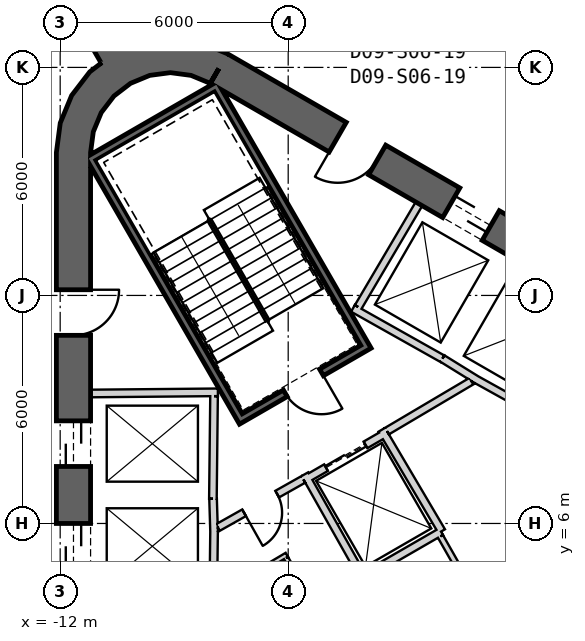
"""IFC4 building model, lengths in metres.
Left out: names, types, materials, properties, quantities, classifications, styles, units other than length and angle.
Written with IfcOpenShell. Run it as: python <this file> out.ifc"""

import sys

from ifc_helpers import new_model, si_unit, direction, frame, frame_2d, origin, place, context, subcontext, project, spatial, polyline, rectangle, outline, extrude, element, fill, save


model = new_model("IFC4")
c1 = context("Model", 3, precision=1e-05, world=origin(), true_north=direction((0.0, 1.0)))
c2 = subcontext(c1, "Body", "Model", "MODEL_VIEW")
j1 = project(units=[si_unit("LENGTHUNIT", "METRE"), si_unit("PLANEANGLEUNIT", "RADIAN")], contexts=[c1])
p1 = place(None, origin())
s1 = spatial("IfcSite", under=j1, at=p1, CompositionType="ELEMENT")
p2 = place(p1, origin())
s2 = spatial("IfcBuilding", under=s1, at=p2, CompositionType="ELEMENT")
p3 = place(p2, frame((0.0, 0.0, 119.3)))
s3 = spatial("IfcBuildingStorey", under=s2, at=p3, CompositionType="ELEMENT", Elevation=119.3)
p4 = place(p3, frame((19.475, 2.208, 0.0), z_axis=(0.0, 0.0, 1.0), x_axis=(-0.866028369851, 0.499994862586, 0.0)))
e1 = element("IfcWall", 1, at=p4, inside=s3, PredefinedType="SHEAR", context=c2, shape_type="SweptSolid", body=[
    extrude(rectangle(XDim=31.523, YDim=0.9, at=frame_2d((15.762, 0.0))), origin(), (0.0, 0.0, 1.0), 4.1),
])
p5 = place(p4, frame((7.062, 0.0, 0.0)))
e2 = element("IfcOpeningElement", 2, at=p5, cuts=e1, PredefinedType="OPENING", context=c2, shape_type="SweptSolid", body=[
    extrude(rectangle(XDim=1.2, YDim=2.4, at=frame_2d((0.6, 1.2))), frame((0.0, 0.46, 0.0), z_axis=(0.0, -1.0, 0.0), x_axis=(1.0, 0.0, 0.0)), (0.0, 0.0, 1.0), 0.92),
])
p6 = place(p4, frame((9.762, 0.0, 0.0)))
e3 = element("IfcOpeningElement", 3, at=p6, cuts=e1, PredefinedType="OPENING", context=c2, shape_type="SweptSolid", body=[
    extrude(rectangle(XDim=1.2, YDim=2.4, at=frame_2d((0.6, 1.2))), frame((0.0, 0.46, 0.0), z_axis=(0.0, -1.0, 0.0), x_axis=(1.0, 0.0, 0.0)), (0.0, 0.0, 1.0), 0.92),
])
p7 = place(p4, frame((12.462, 0.0, 0.0)))
e4 = element("IfcOpeningElement", 4, at=p7, cuts=e1, PredefinedType="OPENING", context=c2, shape_type="SweptSolid", body=[
    extrude(rectangle(XDim=1.2, YDim=2.4, at=frame_2d((0.6, 1.2))), frame((0.0, 0.46, 0.0), z_axis=(0.0, -1.0, 0.0), x_axis=(1.0, 0.0, 0.0)), (0.0, 0.0, 1.0), 0.92),
])
p8 = place(p4, frame((15.162, 0.0, 0.0)))
e5 = element("IfcOpeningElement", 5, at=p8, cuts=e1, PredefinedType="OPENING", context=c2, shape_type="SweptSolid", body=[
    extrude(rectangle(XDim=1.2, YDim=2.4, at=frame_2d((0.6, 1.2))), frame((0.0, 0.46, 0.0), z_axis=(0.0, -1.0, 0.0), x_axis=(1.0, 0.0, 0.0)), (0.0, 0.0, 1.0), 0.92),
])
p9 = place(p4, frame((17.862, 0.0, 0.0)))
e6 = element("IfcOpeningElement", 6, at=p9, cuts=e1, PredefinedType="OPENING", context=c2, shape_type="SweptSolid", body=[
    extrude(rectangle(XDim=1.2, YDim=2.4, at=frame_2d((0.6, 1.2))), frame((0.0, 0.46, 0.0), z_axis=(0.0, -1.0, 0.0), x_axis=(1.0, 0.0, 0.0)), (0.0, 0.0, 1.0), 0.92),
])
p10 = place(p4, frame((20.562, 0.0, 0.0)))
e7 = element("IfcOpeningElement", 7, at=p10, cuts=e1, PredefinedType="OPENING", context=c2, shape_type="SweptSolid", body=[
    extrude(rectangle(XDim=1.2, YDim=2.4, at=frame_2d((0.6, 1.2))), frame((0.0, 0.46, 0.0), z_axis=(0.0, -1.0, 0.0), x_axis=(1.0, 0.0, 0.0)), (0.0, 0.0, 1.0), 0.92),
])
p11 = place(p4, frame((23.262, 0.0, 0.0)))
e8 = element("IfcOpeningElement", 8, at=p11, cuts=e1, PredefinedType="OPENING", context=c2, shape_type="SweptSolid", body=[
    extrude(rectangle(XDim=1.2, YDim=2.4, at=frame_2d((0.6, 1.2))), frame((0.0, 0.46, 0.0), z_axis=(0.0, -1.0, 0.0), x_axis=(1.0, 0.0, 0.0)), (0.0, 0.0, 1.0), 0.92),
])
p12 = place(p4, frame((3.612, 0.0, 0.0)))
e9 = element("IfcOpeningElement", 9, at=p12, cuts=e1, PredefinedType="OPENING", context=c2, shape_type="SweptSolid", body=[
    extrude(rectangle(XDim=1.2, YDim=2.4, at=frame_2d((0.6, 1.2))), frame((0.0, 0.46, 0.0), z_axis=(0.0, -1.0, 0.0), x_axis=(1.0, 0.0, 0.0)), (0.0, 0.0, 1.0), 0.92),
])
p13 = place(p4, frame((26.712, 0.0, 0.0)))
e10 = element("IfcOpeningElement", 10, at=p13, cuts=e1, PredefinedType="OPENING", context=c2, shape_type="SweptSolid", body=[
    extrude(rectangle(XDim=1.2, YDim=2.4, at=frame_2d((0.6, 1.2))), frame((0.0, 0.46, 0.0), z_axis=(0.0, -1.0, 0.0), x_axis=(1.0, 0.0, 0.0)), (0.0, 0.0, 1.0), 0.92),
])
p14 = place(p3, frame((-11.65, 15.762, 0.0), z_axis=(0.0, 0.0, 1.0), x_axis=(0.0, -1.0, 0.0)))
e11 = element("IfcWall", 11, at=p14, inside=s3, PredefinedType="SHEAR", context=c2, shape_type="SweptSolid", body=[
    extrude(rectangle(XDim=31.523, YDim=0.9, at=frame_2d((15.762, 0.0))), origin(), (0.0, 0.0, 1.0), 4.1),
])
p15 = place(p14, frame((7.062, 0.0, 0.0)))
e12 = element("IfcOpeningElement", 12, at=p15, cuts=e11, PredefinedType="OPENING", context=c2, shape_type="SweptSolid", body=[
    extrude(rectangle(XDim=1.2, YDim=2.4, at=frame_2d((0.6, 1.2))), frame((0.0, 0.46, 0.0), z_axis=(0.0, -1.0, 0.0), x_axis=(1.0, 0.0, 0.0)), (0.0, 0.0, 1.0), 0.92),
])
p16 = place(p14, frame((9.762, 0.0, 0.0)))
e13 = element("IfcOpeningElement", 13, at=p16, cuts=e11, PredefinedType="OPENING", context=c2, shape_type="SweptSolid", body=[
    extrude(rectangle(XDim=1.2, YDim=2.4, at=frame_2d((0.6, 1.2))), frame((0.0, 0.46, 0.0), z_axis=(0.0, -1.0, 0.0), x_axis=(1.0, 0.0, 0.0)), (0.0, 0.0, 1.0), 0.92),
])
p17 = place(p14, frame((12.462, 0.0, 0.0)))
e14 = element("IfcOpeningElement", 14, at=p17, cuts=e11, PredefinedType="OPENING", context=c2, shape_type="SweptSolid", body=[
    extrude(rectangle(XDim=1.2, YDim=2.4, at=frame_2d((0.6, 1.2))), frame((0.0, 0.46, 0.0), z_axis=(0.0, -1.0, 0.0), x_axis=(1.0, 0.0, 0.0)), (0.0, 0.0, 1.0), 0.92),
])
p18 = place(p14, frame((15.162, 0.0, 0.0)))
e15 = element("IfcOpeningElement", 15, at=p18, cuts=e11, PredefinedType="OPENING", context=c2, shape_type="SweptSolid", body=[
    extrude(rectangle(XDim=1.2, YDim=2.4, at=frame_2d((0.6, 1.2))), frame((0.0, 0.46, 0.0), z_axis=(0.0, -1.0, 0.0), x_axis=(1.0, 0.0, 0.0)), (0.0, 0.0, 1.0), 0.92),
])
p19 = place(p14, frame((17.862, 0.0, 0.0)))
e16 = element("IfcOpeningElement", 16, at=p19, cuts=e11, PredefinedType="OPENING", context=c2, shape_type="SweptSolid", body=[
    extrude(rectangle(XDim=1.2, YDim=2.4, at=frame_2d((0.6, 1.2))), frame((0.0, 0.46, 0.0), z_axis=(0.0, -1.0, 0.0), x_axis=(1.0, 0.0, 0.0)), (0.0, 0.0, 1.0), 0.92),
])
p20 = place(p14, frame((20.562, 0.0, 0.0)))
e17 = element("IfcOpeningElement", 17, at=p20, cuts=e11, PredefinedType="OPENING", context=c2, shape_type="SweptSolid", body=[
    extrude(rectangle(XDim=1.2, YDim=2.4, at=frame_2d((0.6, 1.2))), frame((0.0, 0.46, 0.0), z_axis=(0.0, -1.0, 0.0), x_axis=(1.0, 0.0, 0.0)), (0.0, 0.0, 1.0), 0.92),
])
p21 = place(p14, frame((23.262, 0.0, 0.0)))
e18 = element("IfcOpeningElement", 18, at=p21, cuts=e11, PredefinedType="OPENING", context=c2, shape_type="SweptSolid", body=[
    extrude(rectangle(XDim=1.2, YDim=2.4, at=frame_2d((0.6, 1.2))), frame((0.0, 0.46, 0.0), z_axis=(0.0, -1.0, 0.0), x_axis=(1.0, 0.0, 0.0)), (0.0, 0.0, 1.0), 0.92),
])
p22 = place(p14, frame((3.612, 0.0, 0.0)))
e19 = element("IfcOpeningElement", 19, at=p22, cuts=e11, PredefinedType="OPENING", context=c2, shape_type="SweptSolid", body=[
    extrude(rectangle(XDim=1.2, YDim=2.4, at=frame_2d((0.6, 1.2))), frame((0.0, 0.46, 0.0), z_axis=(0.0, -1.0, 0.0), x_axis=(1.0, 0.0, 0.0)), (0.0, 0.0, 1.0), 0.92),
])
p23 = place(p14, frame((26.712, 0.0, 0.0)))
e20 = element("IfcOpeningElement", 20, at=p23, cuts=e11, PredefinedType="OPENING", context=c2, shape_type="SweptSolid", body=[
    extrude(rectangle(XDim=1.2, YDim=2.4, at=frame_2d((0.6, 1.2))), frame((0.0, 0.46, 0.0), z_axis=(0.0, -1.0, 0.0), x_axis=(1.0, 0.0, 0.0)), (0.0, 0.0, 1.0), 0.92),
])
p24 = place(p3, origin())
e21 = element("IfcWall", 21, at=p24, inside=s3, PredefinedType="SHEAR", context=c2, shape_type="SweptSolid", body=[
    extrude(outline(polyline([(-7.6, 18.36), (-8.323, 18.659), (-9.1, 18.762), (-9.876, 18.659), (-10.6, 18.36), (-11.221, 17.883), (-11.698, 17.262), (-11.998, 16.538), (-12.1, 15.762), (-11.2, 15.762), (-11.128, 16.305), (-10.919, 16.812), (-10.585, 17.247), (-10.15, 17.58), (-9.644, 17.79), (-9.1, 17.862), (-8.556, 17.79), (-8.05, 17.58), (-7.6, 18.36)])), origin(), (0.0, 0.0, 1.0), 4.1),
])
p25 = place(p3, frame((-10.575, 18.316, 0.0), z_axis=(0.0, 0.0, 1.0), x_axis=(-0.500008359956, 0.866020577108, 0.0)))
e22 = element("IfcWall", 22, at=p25, inside=s3, PredefinedType="SHEAR", context=c2, shape_type="SweptSolid", body=[
    extrude(rectangle(XDim=12.812, YDim=0.8, at=frame_2d((6.406, 0.0))), origin(), (0.0, 0.0, 1.0), 4.1),
])
p26 = place(p25, frame((1.9, 0.0, 0.0)))
e23 = element("IfcOpeningElement", 23, at=p26, cuts=e22, PredefinedType="OPENING", context=c2, shape_type="SweptSolid", body=[
    extrude(rectangle(XDim=1.4, YDim=2.4, at=frame_2d((0.7, 1.2))), frame((0.0, 0.41, 0.0), z_axis=(0.0, -1.0, 0.0), x_axis=(1.0, 0.0, 0.0)), (0.0, 0.0, 1.0), 0.82),
])
p27 = place(p3, frame((-11.2, 9.42, 0.0), z_axis=(0.0, 0.0, 1.0), x_axis=(0.999957167047, 0.009255488683, 0.0)))
e24 = element("IfcWall", 24, at=p27, inside=s3, PredefinedType="PLUMBINGWALL", context=c2, shape_type="SweptSolid", body=[
    extrude(rectangle(XDim=3.35, YDim=0.2, at=frame_2d((1.675, 0.0))), origin(), (0.0, 0.0, 1.0), 3.8),
])
p28 = place(p3, frame((-7.951, 9.35, 0.0), z_axis=(0.0, 0.0, 1.0), x_axis=(-0.011120469654, -0.999938165666, 0.0)))
e25 = element("IfcWall", 25, at=p28, inside=s3, PredefinedType="PLUMBINGWALL", context=c2, shape_type="SweptSolid", body=[
    extrude(rectangle(XDim=2.7, YDim=0.2, at=frame_2d((1.35, 0.0))), origin(), (0.0, 0.0, 1.0), 3.8),
])
p29 = place(p3, frame((-7.977, 6.65, 0.0), z_axis=(0.0, 0.0, 1.0), x_axis=(0.030861509705, -0.999523670164, 0.0)))
e26 = element("IfcWall", 26, at=p29, inside=s3, PredefinedType="PLUMBINGWALL", context=c2, shape_type="SweptSolid", body=[
    extrude(rectangle(XDim=0.878, YDim=0.2, at=frame_2d((0.439, 0.0))), origin(), (0.0, 0.0, 1.0), 3.8),
])
p30 = place(p3, frame((-7.949, 5.895, 0.0), z_axis=(0.0, 0.0, 1.0), x_axis=(-0.012042535896, -0.999927486035, 0.0)))
e27 = element("IfcWall", 27, at=p30, inside=s3, PredefinedType="PLUMBINGWALL", context=c2, shape_type="SweptSolid", body=[
    extrude(rectangle(XDim=1.845, YDim=0.2, at=frame_2d((0.922, 0.0))), origin(), (0.0, 0.0, 1.0), 3.8),
])
p31 = place(p3, frame((-1.941, 10.339, 0.0), z_axis=(0.0, 0.0, 1.0), x_axis=(0.850216889117, -0.526432561171, 0.0)))
e28 = element("IfcWall", 28, at=p31, inside=s3, PredefinedType="PLUMBINGWALL", context=c2, shape_type="SweptSolid", body=[
    extrude(rectangle(XDim=1.078, YDim=0.2, at=frame_2d((0.539, 0.0))), origin(), (0.0, 0.0, 1.0), 3.8),
])
p32 = place(p3, frame((0.483, 8.936, 0.0), z_axis=(0.0, 0.0, 1.0), x_axis=(-0.874269620932, 0.485440655401, 0.0)))
e29 = element("IfcWall", 29, at=p32, inside=s3, PredefinedType="PLUMBINGWALL", context=c2, shape_type="SweptSolid", body=[
    extrude(rectangle(XDim=1.845, YDim=0.2, at=frame_2d((0.922, 0.0))), origin(), (0.0, 0.0, 1.0), 3.8),
])
p33 = place(p3, frame((-4.296, 11.659, 0.0), z_axis=(0.0, 0.0, 1.0), x_axis=(0.871534483978, -0.490334215854, 0.0)))
e30 = element("IfcWall", 30, at=p33, inside=s3, PredefinedType="PLUMBINGWALL", context=c2, shape_type="SweptSolid", body=[
    extrude(rectangle(XDim=2.7, YDim=0.2, at=frame_2d((1.35, 0.0))), origin(), (0.0, 0.0, 1.0), 3.8),
])
p34 = place(p3, frame((-4.158, 11.696, 0.0), z_axis=(0.0, 0.0, 1.0), x_axis=(0.508018930956, 0.861345903683, 0.0)))
e31 = element("IfcWall", 31, at=p34, inside=s3, PredefinedType="PLUMBINGWALL", context=c2, shape_type="SweptSolid", body=[
    extrude(rectangle(XDim=3.15, YDim=0.2, at=frame_2d((1.575, 0.0))), origin(), (0.0, 0.0, 1.0), 3.8),
])
p35 = place(p3, frame((-11.245, 15.678, -0.3), z_axis=(0.0, 0.0, 1.0), x_axis=(0.499977274689, -0.866038523851, 0.0)))
e32 = element("IfcWall", 32, at=p35, inside=s3, PredefinedType="SHEAR", context=c2, shape_type="SweptSolid", body=[
    extrude(rectangle(XDim=8.1, YDim=0.2, at=frame_2d((4.05, 0.0))), origin(), (0.0, 0.0, 1.0), 4.1),
])
p36 = place(p3, frame((-7.818, 17.541, -0.3), z_axis=(0.0, 0.0, 1.0), x_axis=(-0.866044365799, -0.499967155389, 0.0)))
e33 = element("IfcWall", 33, at=p36, inside=s3, PredefinedType="SHEAR", context=c2, shape_type="SweptSolid", body=[
    extrude(rectangle(XDim=3.8, YDim=0.2, at=frame_2d((1.9, 0.0))), origin(), (0.0, 0.0, 1.0), 4.1),
])
p37 = place(p3, frame((-7.854, 17.405, -0.3), z_axis=(0.0, 0.0, 1.0), x_axis=(0.499997992926, -0.866026562566, 0.0)))
e34 = element("IfcWall", 34, at=p37, inside=s3, PredefinedType="SHEAR", context=c2, shape_type="SweptSolid", body=[
    extrude(rectangle(XDim=7.9, YDim=0.2, at=frame_2d((3.95, 0.0))), origin(), (0.0, 0.0, 1.0), 4.1),
])
p38 = place(p3, frame((-7.159, 8.8, -0.3), z_axis=(0.0, 0.0, 1.0), x_axis=(0.866047807691, 0.499961193289, 0.0)))
e35 = element("IfcWall", 35, at=p38, inside=s3, PredefinedType="SHEAR", context=c2, shape_type="SweptSolid", body=[
    extrude(rectangle(XDim=3.6, YDim=0.2, at=frame_2d((1.8, 0.0))), origin(), (0.0, 0.0, 1.0), 4.1),
])
p39 = place(p38, frame((1.25, 0.0, 0.3)))
e36 = element("IfcOpeningElement", 36, at=p39, cuts=e35, PredefinedType="OPENING", context=c2, shape_type="SweptSolid", body=[
    extrude(rectangle(XDim=1.1, YDim=2.1, at=frame_2d((0.55, 1.05))), frame((0.0, 0.11, 0.0), z_axis=(0.0, -1.0, 0.0), x_axis=(1.0, 0.0, 0.0)), (0.0, 0.0, 1.0), 0.22),
])
p40 = place(p3, frame((-5.524, 7.168, 0.0), z_axis=(0.0, 0.0, 1.0), x_axis=(0.866024647952, 0.500001309137, 0.0)))
e37 = element("IfcWall", 37, at=p40, inside=s3, PredefinedType="PLUMBINGWALL", context=c2, shape_type="SweptSolid", body=[
    extrude(rectangle(XDim=2.4, YDim=0.2, at=frame_2d((1.2, 0.0))), origin(), (0.0, 0.0, 1.0), 3.8),
])
p41 = place(p40, frame((0.6, 0.0, 0.0)))
e38 = element("IfcOpeningElement", 38, at=p41, cuts=e37, PredefinedType="OPENING", context=c2, shape_type="SweptSolid", body=[
    extrude(rectangle(XDim=1.2, YDim=2.4, at=frame_2d((0.6, 1.2))), frame((0.0, 0.11, 0.0), z_axis=(0.0, -1.0, 0.0), x_axis=(1.0, 0.0, 0.0)), (0.0, 0.0, 1.0), 0.22),
])
p42 = place(p3, frame((-3.538, 8.465, 0.0), z_axis=(0.0, 0.0, 1.0), x_axis=(0.508647062354, -0.860975125052, 0.0)))
e39 = element("IfcWall", 39, at=p42, inside=s3, PredefinedType="PLUMBINGWALL", context=c2, shape_type="SweptSolid", body=[
    extrude(rectangle(XDim=3.1, YDim=0.2, at=frame_2d((1.55, 0.0))), origin(), (0.0, 0.0, 1.0), 3.8),
])
p43 = place(p3, frame((-1.979, 5.786, 0.0), z_axis=(0.0, 0.0, 1.0), x_axis=(-0.866016689309, -0.500015093611, 0.0)))
e40 = element("IfcWall", 40, at=p43, inside=s3, PredefinedType="PLUMBINGWALL", context=c2, shape_type="SweptSolid", body=[
    extrude(rectangle(XDim=2.479, YDim=0.2, at=frame_2d((1.24, 0.0))), origin(), (0.0, 0.0, 1.0), 3.8),
])
p44 = place(p3, frame((-5.562, 7.296, 0.0), z_axis=(0.0, 0.0, 1.0), x_axis=(0.49134651263, -0.870964180966, 0.0)))
e41 = element("IfcWall", 41, at=p44, inside=s3, PredefinedType="PLUMBINGWALL", context=c2, shape_type="SweptSolid", body=[
    extrude(rectangle(XDim=3.0, YDim=0.2, at=frame_2d((1.5, 0.0))), origin(), (0.0, 0.0, 1.0), 3.8),
])
p45 = place(p3, frame((-1.18, 9.744, 0.0), z_axis=(0.0, 0.0, 1.0), x_axis=(-0.860615607571, -0.509255118781, 0.0)))
e42 = element("IfcWall", 42, at=p45, inside=s3, PredefinedType="PARTITIONING", context=c2, shape_type="SweptSolid", body=[
    extrude(rectangle(XDim=2.581, YDim=0.2, at=frame_2d((1.29, 0.0))), origin(), (0.0, 0.0, 1.0), 3.8),
])
p46 = place(p3, frame((-5.6, 7.16, 0.0), z_axis=(0.0, 0.0, 1.0), x_axis=(-0.871363259478, -0.490638431059, 0.0)))
e43 = element("IfcWall", 43, at=p46, inside=s3, PredefinedType="PARTITIONING", context=c2, shape_type="SweptSolid", body=[
    extrude(rectangle(XDim=2.581, YDim=0.2, at=frame_2d((1.291, 0.0))), origin(), (0.0, 0.0, 1.0), 3.8),
])
p47 = place(p46, frame((0.791, 0.0, 0.0)))
e44 = element("IfcOpeningElement", 44, at=p47, cuts=e43, PredefinedType="OPENING", context=c2, shape_type="SweptSolid", body=[
    extrude(rectangle(XDim=1.0, YDim=2.1, at=frame_2d((0.5, 1.05))), frame((0.0, 0.11, 0.0), z_axis=(0.0, -1.0, 0.0), x_axis=(1.0, 0.0, 0.0)), (0.0, 0.0, 1.0), 0.22),
])
p48 = place(p3, frame((-1.994, 5.661, 0.0), z_axis=(0.0, 0.0, 1.0), x_axis=(0.494341211302, -0.869267948798, 0.0)))
e45 = element("IfcWall", 45, at=p48, inside=s3, PredefinedType="PLUMBINGWALL", context=c2, shape_type="SweptSolid", body=[
    extrude(rectangle(XDim=4.361, YDim=0.15, at=frame_2d((2.18, 0.0))), origin(), (0.0, 0.0, 1.0), 3.8),
])
p49 = place(p3, frame((-6.037, 5.176, 0.0), z_axis=(0.0, 0.0, 1.0), x_axis=(-0.860106072674, -0.510115225953, 0.0)))
e46 = element("IfcWall", 46, at=p49, inside=s3, PredefinedType="PARTITIONING", context=c2, shape_type="SweptSolid", body=[
    extrude(rectangle(XDim=2.225, YDim=0.12, at=frame_2d((1.112, 0.0))), origin(), (0.0, 0.0, 1.0), 3.8),
])
p50 = place(p3, frame((-4.558, 2.495, 0.0), z_axis=(0.0, 0.0, 1.0), x_axis=(-0.499990139034, 0.866031096941, 0.0)))
e47 = element("IfcWall", 47, at=p50, inside=s3, PredefinedType="PARTITIONING", context=c2, shape_type="SweptSolid", body=[
    extrude(rectangle(XDim=3.0, YDim=0.12, at=frame_2d((1.5, 0.0))), origin(), (0.0, 0.0, 1.0), 3.8),
])
p51 = place(p3, frame((22.727, 5.931, 0.0), z_axis=(0.0, 0.0, 1.0), x_axis=(-0.866024609098, 0.500001376435, 0.0)))
e48 = element("IfcWall", 48, at=p51, inside=s3, PredefinedType="PARTITIONING", context=c2, shape_type="SweptSolid", body=[
    extrude(rectangle(XDim=26.847, YDim=0.2, at=frame_2d((13.424, 0.0))), origin(), (0.0, 0.0, 1.0), 2.98),
])
p52 = place(p51, frame((16.578, 0.0, 0.0)))
e49 = element("IfcOpeningElement", 49, at=p52, cuts=e48, PredefinedType="OPENING", context=c2, shape_type="SweptSolid", body=[
    extrude(rectangle(XDim=1.0, YDim=2.1, at=frame_2d((0.5, 1.05))), frame((0.0, 0.11, 0.0), z_axis=(0.0, -1.0, 0.0), x_axis=(1.0, 0.0, 0.0)), (0.0, 0.0, 1.0), 0.22),
])
p53 = place(p51, frame((4.829, 0.0, 0.0)))
e50 = element("IfcOpeningElement", 50, at=p53, cuts=e48, PredefinedType="OPENING", context=c2, shape_type="SweptSolid", body=[
    extrude(rectangle(XDim=1.0, YDim=2.1, at=frame_2d((0.5, 1.05))), frame((0.0, 0.11, 0.0), z_axis=(0.0, -1.0, 0.0), x_axis=(1.0, 0.0, 0.0)), (0.0, 0.0, 1.0), 0.22),
])
p54 = place(p39, origin())
e51 = element("IfcDoor", 51, at=p54, inside=s3, OperationType="SINGLE_SWING_LEFT", PredefinedType="USERDEFINED", context=c2, shape_type="SweptSolid", body=[
    extrude(rectangle(XDim=1.1, YDim=2.1, at=frame_2d((0.55, 1.05))), frame((0.0, 0.025, 0.0), z_axis=(0.0, -1.0, 0.0), x_axis=(1.0, 0.0, 0.0)), (0.0, 0.0, 1.0), 0.05),
])
fill(e36, e51)
p55 = place(p47, origin())
e52 = element("IfcDoor", 52, at=p55, inside=s3, OperationType="SINGLE_SWING_RIGHT", PredefinedType="USERDEFINED", context=c2, shape_type="SweptSolid", body=[
    extrude(rectangle(XDim=1.0, YDim=2.1, at=frame_2d((0.5, 1.05))), frame((0.0, 0.025, 0.0), z_axis=(0.0, -1.0, 0.0), x_axis=(1.0, 0.0, 0.0)), (0.0, 0.0, 1.0), 0.05),
])
fill(e44, e52)
p56 = place(p41, origin())
e53 = element("IfcDoor", 53, at=p56, inside=s3, OperationType="SLIDING_TO_LEFT", PredefinedType="USERDEFINED", context=c2, shape_type="SweptSolid", body=[
    extrude(rectangle(XDim=1.2, YDim=2.4, at=frame_2d((0.6, 1.2))), frame((0.0, 0.025, 0.0), z_axis=(0.0, -1.0, 0.0), x_axis=(1.0, 0.0, 0.0)), (0.0, 0.0, 1.0), 0.05),
])
fill(e38, e53)
p57 = place(p15, origin())
e54 = element("IfcDoor", 54, at=p57, inside=s3, OperationType="SLIDING_TO_LEFT", PredefinedType="USERDEFINED", context=c2, shape_type="SweptSolid", body=[
    extrude(rectangle(XDim=1.2, YDim=2.4, at=frame_2d((0.6, 1.2))), frame((0.0, 0.025, 0.0), z_axis=(0.0, -1.0, 0.0), x_axis=(1.0, 0.0, 0.0)), (0.0, 0.0, 1.0), 0.05),
])
fill(e12, e54)
p58 = place(p16, origin())
e55 = element("IfcDoor", 55, at=p58, inside=s3, OperationType="SLIDING_TO_LEFT", PredefinedType="USERDEFINED", context=c2, shape_type="SweptSolid", body=[
    extrude(rectangle(XDim=1.2, YDim=2.4, at=frame_2d((0.6, 1.2))), frame((0.0, 0.025, 0.0), z_axis=(0.0, -1.0, 0.0), x_axis=(1.0, 0.0, 0.0)), (0.0, 0.0, 1.0), 0.05),
])
fill(e13, e55)
p59 = place(p11, origin())
e56 = element("IfcDoor", 56, at=p59, inside=s3, OperationType="SLIDING_TO_LEFT", PredefinedType="USERDEFINED", context=c2, shape_type="SweptSolid", body=[
    extrude(rectangle(XDim=1.2, YDim=2.4, at=frame_2d((0.6, 1.2))), frame((0.0, 0.025, 0.0), z_axis=(0.0, -1.0, 0.0), x_axis=(1.0, 0.0, 0.0)), (0.0, 0.0, 1.0), 0.05),
])
fill(e8, e56)
p60 = place(p13, origin())
e57 = element("IfcDoor", 57, at=p60, inside=s3, OperationType="SINGLE_SWING_LEFT", PredefinedType="USERDEFINED", context=c2, shape_type="SweptSolid", body=[
    extrude(rectangle(XDim=1.2, YDim=2.4, at=frame_2d((0.6, 1.2))), frame((0.0, 0.025, 0.0), z_axis=(0.0, -1.0, 0.0), x_axis=(1.0, 0.0, 0.0)), (0.0, 0.0, 1.0), 0.05),
])
fill(e10, e57)
p61 = place(p22, origin())
e58 = element("IfcDoor", 58, at=p61, inside=s3, OperationType="SINGLE_SWING_RIGHT", PredefinedType="USERDEFINED", context=c2, shape_type="SweptSolid", body=[
    extrude(rectangle(XDim=1.2, YDim=2.4, at=frame_2d((0.6, 1.2))), frame((0.0, 0.025, 0.0), z_axis=(0.0, -1.0, 0.0), x_axis=(1.0, 0.0, 0.0)), (0.0, 0.0, 1.0), 0.05),
])
fill(e19, e58)
save(model, sys.argv[1])
